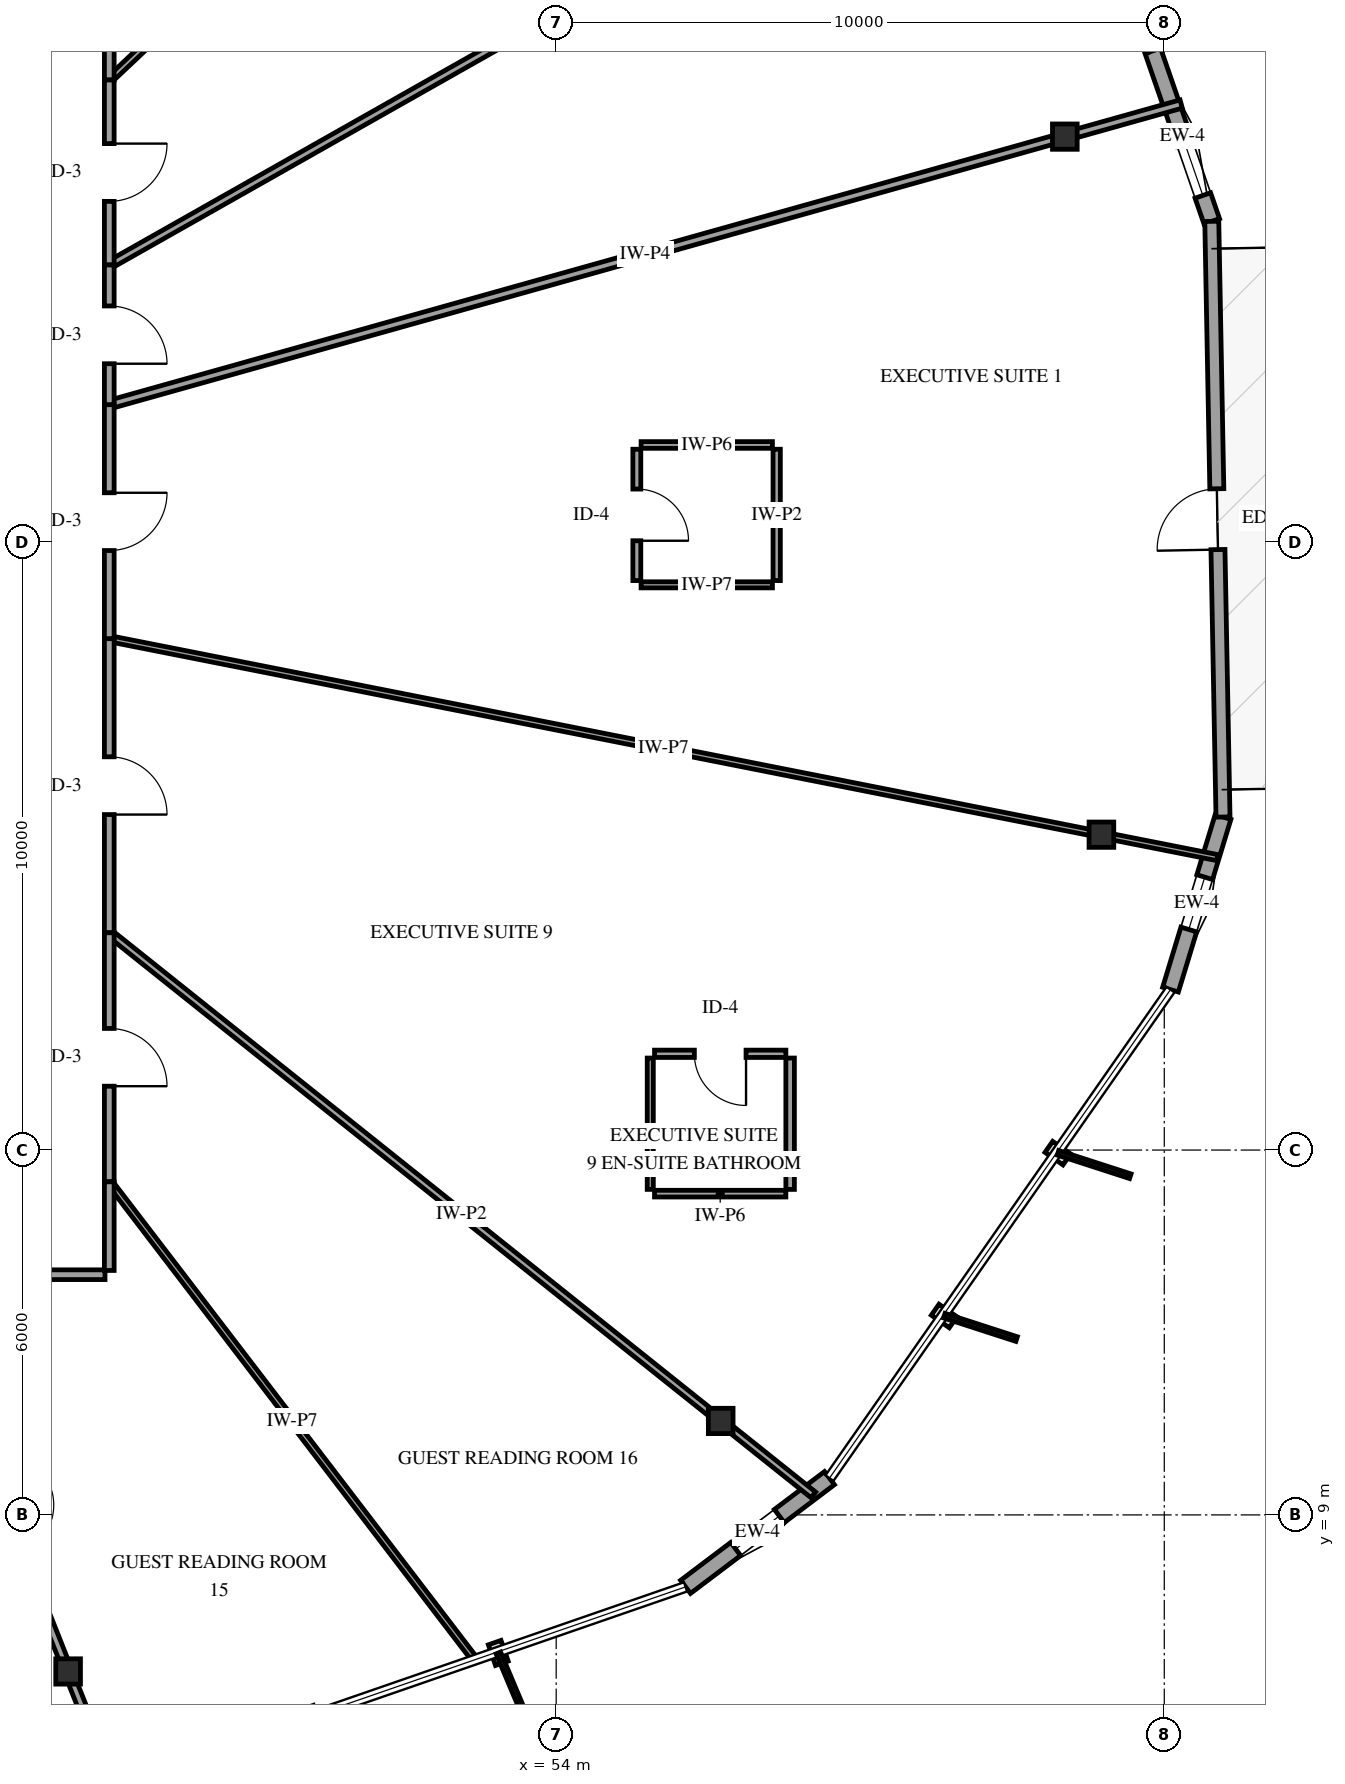
"""IFC4 building model, lengths in metres.
Left out: names, types, materials, properties, quantities, classifications, styles, units other than length and angle.
Written with IfcOpenShell. Run it as: python <this file> out.ifc"""

import sys

from ifc_helpers import new_model, si_unit, direction, frame, frame_2d, origin, origin_2d, place, context, subcontext, project, spatial, rectangle, i_section, extrude, element, fill, save


model = new_model("IFC4")
c1 = context("Model", 3, precision=1e-05, world=origin(), true_north=direction((0.0, 1.0)))
c2 = subcontext(c1, "Body", "Model", "MODEL_VIEW")
j1 = project(units=[si_unit("LENGTHUNIT", "METRE"), si_unit("PLANEANGLEUNIT", "RADIAN")], contexts=[c1])
p1 = place(None, origin())
s1 = spatial("IfcSite", under=j1, at=p1, CompositionType="ELEMENT")
p2 = place(p1, origin())
s2 = spatial("IfcBuilding", under=s1, at=p2, CompositionType="ELEMENT")
p3 = place(p2, frame((0.0, 0.0, 233.8)))
s3 = spatial("IfcBuildingStorey", under=s2, at=p3, CompositionType="ELEMENT", Elevation=233.8)
for number, where, z_axis, x_axis in (
    (1, (62.365, 31.666, 0.0), (0.0, 0.0, 1.0), (1.0, 0.0, 0.0)),
    (2, (45.973, 6.426, 0.0), (0.0, 0.0, 1.0), (1.0, 0.0, 0.0)),
    (3, (56.705, 10.545, 0.0), (0.0, 0.0, 1.0), (1.0, 0.0, 0.0)),
    (4, (62.966, 20.186, 0.0), (0.0, 0.0, 1.0), (1.0, 0.0, 0.0)),
):
    element("IfcColumn", number, at=place(p3, frame(where, z_axis=z_axis, x_axis=x_axis)), inside=s3, PredefinedType="COLUMN", context=c2, shape_type="SweptSolid", body=[
        extrude(i_section(OverallWidth=0.406, OverallDepth=0.416, WebThickness=0.03, FlangeThickness=0.048, FilletRadius=0.038, at=origin_2d()), origin(), (0.0, 0.0, 1.0), 3.6),
    ])
p4 = place(p3, frame((56.127, 7.816, 0.0), z_axis=(0.0, 0.0, 1.0), x_axis=(0.797802225535, 0.602919239145, 0.0)))
e5 = element("IfcWall", 5, at=p4, inside=s3, PredefinedType="SOLIDWALL", context=c2, shape_type="SweptSolid", body=[
    extrude(rectangle(XDim=2.967, YDim=0.27, at=frame_2d((1.483, 0.0))), origin(), (0.0, 0.0, 1.0), 2.599),
])
p5 = place(p4, frame((1.033, 0.0, 0.75)))
e6 = element("IfcOpeningElement", 6, at=p5, cuts=e5, PredefinedType="OPENING", context=c2, shape_type="SweptSolid", body=[
    extrude(rectangle(XDim=0.9, YDim=1.5, at=frame_2d((0.45, 0.75))), frame((0.0, 0.145, 0.0), z_axis=(0.0, -1.0, 0.0), x_axis=(1.0, 0.0, 0.0)), (0.0, 0.0, 1.0), 0.29),
])
p6 = place(p3, frame((64.103, 17.638, 0.0), z_axis=(0.0, 0.0, 1.0), x_axis=(0.290984782506, 0.956727681396, 0.0)))
e7 = element("IfcWall", 7, at=p6, inside=s3, PredefinedType="SOLIDWALL", context=c2, shape_type="SweptSolid", body=[
    extrude(rectangle(XDim=2.967, YDim=0.27, at=frame_2d((1.483, 0.0))), origin(), (0.0, 0.0, 1.0), 2.599),
])
p7 = place(p6, frame((1.033, 0.0, 0.75)))
e8 = element("IfcOpeningElement", 8, at=p7, cuts=e7, PredefinedType="OPENING", context=c2, shape_type="SweptSolid", body=[
    extrude(rectangle(XDim=0.9, YDim=1.5, at=frame_2d((0.45, 0.75))), frame((0.0, 0.145, 0.0), z_axis=(0.0, -1.0, 0.0), x_axis=(1.0, 0.0, 0.0)), (0.0, 0.0, 1.0), 0.29),
])
p8 = place(p3, frame((64.781, 30.273, 0.0), z_axis=(0.0, 0.0, 1.0), x_axis=(-0.326898552416, 0.945059435395, 0.0)))
e9 = element("IfcWall", 9, at=p8, inside=s3, PredefinedType="SOLIDWALL", context=c2, shape_type="SweptSolid", body=[
    extrude(rectangle(XDim=2.967, YDim=0.27, at=frame_2d((1.483, 0.0))), origin(), (0.0, 0.0, 1.0), 2.599),
])
p9 = place(p8, frame((0.45, 0.0, 0.75)))
e10 = element("IfcOpeningElement", 10, at=p9, cuts=e9, PredefinedType="OPENING", context=c2, shape_type="SweptSolid", body=[
    extrude(rectangle(XDim=0.9, YDim=1.5, at=frame_2d((0.45, 0.75))), frame((0.0, 0.145, 0.0), z_axis=(0.0, -1.0, 0.0), x_axis=(1.0, 0.0, 0.0)), (0.0, 0.0, 1.0), 0.29),
])
p10 = place(p3, frame((64.966, 20.477, 0.0), z_axis=(0.0, 0.0, 1.0), x_axis=(-0.018838247523, 0.99982254447, 0.0)))
e11 = element("IfcWall", 11, at=p10, inside=s3, PredefinedType="SOLIDWALL", context=c2, shape_type="SweptSolid", body=[
    extrude(rectangle(XDim=9.798, YDim=0.23, at=frame_2d((4.899, 0.0))), origin(), (0.0, 0.0, 1.0), 2.599),
])
p11 = place(p10, frame((4.399, 0.0, 0.0)))
e12 = element("IfcOpeningElement", 12, at=p11, cuts=e11, PredefinedType="OPENING", context=c2, shape_type="SweptSolid", body=[
    extrude(rectangle(XDim=1.0, YDim=2.15, at=frame_2d((0.5, 1.075))), frame((0.0, 0.125, 0.0), z_axis=(0.0, -1.0, 0.0), x_axis=(1.0, 0.0, 0.0)), (0.0, 0.0, 1.0), 0.25),
])
p12 = place(p3, frame((64.873, 19.809, 0.0), z_axis=(0.0, 0.0, 1.0), x_axis=(-0.981031493606, 0.19384841643, 0.0)))
e13 = element("IfcWall", 13, at=p12, inside=s3, PredefinedType="PARTITIONING", context=c2, shape_type="SweptSolid", body=[
    extrude(rectangle(XDim=18.575, YDim=0.1, at=frame_2d((9.288, 0.0))), origin(), (0.0, 0.0, 1.0), 2.515),
])
p13 = place(p3, frame((46.65, 27.258, 0.0), z_axis=(0.0, 0.0, 1.0), x_axis=(0.962851062981, 0.270033017455, 0.0)))
e14 = element("IfcWall", 14, at=p13, inside=s3, PredefinedType="PARTITIONING", context=c2, shape_type="SweptSolid", body=[
    extrude(rectangle(XDim=18.308, YDim=0.14, at=frame_2d((9.154, 0.0))), origin(), (0.0, 0.0, 1.0), 2.431),
])
p14 = place(p3, frame((46.65, 29.555, 0.0), z_axis=(0.0, 0.0, 1.0), x_axis=(0.870317622411, 0.492490848769, 0.0)))
e15 = element("IfcWall", 15, at=p14, inside=s3, PredefinedType="PARTITIONING", context=c2, shape_type="SweptSolid", body=[
    extrude(rectangle(XDim=15.954, YDim=0.13, at=frame_2d((7.977, 0.0))), origin(), (0.0, 0.0, 1.0), 3.26),
])
p15 = place(p3, frame((46.65, 18.573, 0.0), z_axis=(0.0, 0.0, 1.0), x_axis=(0.781506613228, -0.623896957423, 0.0)))
e16 = element("IfcWall", 16, at=p15, inside=s3, PredefinedType="PARTITIONING", context=c2, shape_type="SweptSolid", body=[
    extrude(rectangle(XDim=14.816, YDim=0.12, at=frame_2d((7.408, 0.0))), origin(), (0.0, 0.0, 1.0), 3.26),
])
p16 = place(p3, frame((46.65, 32.597, 0.0), z_axis=(0.0, 0.0, 1.0), x_axis=(0.727338908676, 0.686278450722, 0.0)))
e17 = element("IfcWall", 17, at=p16, inside=s3, PredefinedType="PARTITIONING", context=c2, shape_type="SweptSolid", body=[
    extrude(rectangle(XDim=13.735, YDim=0.11, at=frame_2d((6.868, 0.0))), origin(), (0.0, 0.0, 1.0), 2.515),
])
p17 = place(p3, frame((46.65, 14.478, 0.0), z_axis=(0.0, 0.0, 1.0), x_axis=(0.60761033938, -0.794235277156, 0.0)))
e18 = element("IfcWall", 18, at=p17, inside=s3, PredefinedType="PARTITIONING", context=c2, shape_type="SweptSolid", body=[
    extrude(rectangle(XDim=9.896, YDim=0.1, at=frame_2d((4.948, 0.0))), origin(), (0.0, 0.0, 1.0), 3.26),
])
p18 = place(p3, frame((43.383, 12.95, 0.0), z_axis=(0.0, 0.0, 1.0), x_axis=(0.369056032082, -0.929407147156, 0.0)))
e19 = element("IfcWall", 19, at=p18, inside=s3, PredefinedType="PARTITIONING", context=c2, shape_type="SweptSolid", body=[
    extrude(rectangle(XDim=9.001, YDim=0.14, at=frame_2d((4.501, 0.0))), origin(), (0.0, 0.0, 1.0), 2.515),
])
p19 = place(p18, frame((4.076, 0.0, 0.0)))
e20 = element("IfcOpeningElement", 20, at=p19, cuts=e19, PredefinedType="OPENING", context=c2, shape_type="SweptSolid", body=[
    extrude(rectangle(XDim=0.85, YDim=2.1, at=frame_2d((0.425, 1.05))), frame((0.0, 0.08, 0.0), z_axis=(0.0, -1.0, 0.0), x_axis=(1.0, 0.0, 0.0)), (0.0, 0.0, 1.0), 0.16),
])
p20 = place(p3, frame((46.65, 23.41, 0.0), z_axis=(0.0, 0.0, 1.0), x_axis=(0.0, -1.0, 0.0)))
e21 = element("IfcWall", 21, at=p20, inside=s3, PredefinedType="PARTITIONING", context=c2, shape_type="SweptSolid", body=[
    extrude(rectangle(XDim=4.837, YDim=0.16, at=frame_2d((2.418, 0.0))), origin(), (0.0, 0.0, 1.0), 3.26),
])
p21 = place(p20, frame((1.943, 0.0, 0.0)))
e22 = element("IfcOpeningElement", 22, at=p21, cuts=e21, PredefinedType="OPENING", context=c2, shape_type="SweptSolid", body=[
    extrude(rectangle(XDim=0.95, YDim=2.15, at=frame_2d((0.475, 1.075))), frame((0.0, 0.09, 0.0), z_axis=(0.0, -1.0, 0.0), x_axis=(1.0, 0.0, 0.0)), (0.0, 0.0, 1.0), 0.18),
])
p22 = place(p3, frame((46.65, 36.98, 0.0), z_axis=(0.0, 0.0, 1.0), x_axis=(0.0, -1.0, 0.0)))
e23 = element("IfcWall", 23, at=p22, inside=s3, PredefinedType="PARTITIONING", context=c2, shape_type="SweptSolid", body=[
    extrude(rectangle(XDim=4.383, YDim=0.16, at=frame_2d((2.191, 0.0))), origin(), (0.0, 0.0, 1.0), 3.26),
])
p23 = place(p3, frame((46.65, 18.573, 0.0), z_axis=(0.0, 0.0, 1.0), x_axis=(0.0, -1.0, 0.0)))
e24 = element("IfcWall", 24, at=p23, inside=s3, PredefinedType="PARTITIONING", context=c2, shape_type="SweptSolid", body=[
    extrude(rectangle(XDim=4.095, YDim=0.16, at=frame_2d((2.047, 0.0))), origin(), (0.0, 0.0, 1.0), 3.26),
])
p24 = place(p23, frame((1.573, 0.0, 0.0)))
e25 = element("IfcOpeningElement", 25, at=p24, cuts=e24, PredefinedType="OPENING", context=c2, shape_type="SweptSolid", body=[
    extrude(rectangle(XDim=0.95, YDim=2.15, at=frame_2d((0.475, 1.075))), frame((0.0, 0.09, 0.0), z_axis=(0.0, -1.0, 0.0), x_axis=(1.0, 0.0, 0.0)), (0.0, 0.0, 1.0), 0.18),
])
p25 = place(p3, frame((46.65, 27.258, 0.0), z_axis=(0.0, 0.0, 1.0), x_axis=(0.0, -1.0, 0.0)))
e26 = element("IfcWall", 26, at=p25, inside=s3, PredefinedType="PARTITIONING", context=c2, shape_type="SweptSolid", body=[
    extrude(rectangle(XDim=3.848, YDim=0.16, at=frame_2d((1.924, 0.0))), origin(), (0.0, 0.0, 1.0), 3.26),
])
p26 = place(p25, frame((1.449, 0.0, 0.0)))
e27 = element("IfcOpeningElement", 27, at=p26, cuts=e26, PredefinedType="OPENING", context=c2, shape_type="SweptSolid", body=[
    extrude(rectangle(XDim=0.95, YDim=2.15, at=frame_2d((0.475, 1.075))), frame((0.0, 0.09, 0.0), z_axis=(0.0, -1.0, 0.0), x_axis=(1.0, 0.0, 0.0)), (0.0, 0.0, 1.0), 0.18),
])
p27 = place(p3, frame((46.58, 12.95, 0.0), z_axis=(0.0, 0.0, 1.0), x_axis=(-1.0, 0.0, 0.0)))
e28 = element("IfcWall", 28, at=p27, inside=s3, PredefinedType="PARTITIONING", context=c2, shape_type="SweptSolid", body=[
    extrude(rectangle(XDim=3.197, YDim=0.16, at=frame_2d((1.599, 0.0))), origin(), (0.0, 0.0, 1.0), 3.26),
])
p28 = place(p27, frame((1.123, 0.0, 0.0)))
e29 = element("IfcOpeningElement", 29, at=p28, cuts=e28, PredefinedType="OPENING", context=c2, shape_type="SweptSolid", body=[
    extrude(rectangle(XDim=0.95, YDim=2.15, at=frame_2d((0.475, 1.075))), frame((0.0, 0.09, 0.0), z_axis=(0.0, -1.0, 0.0), x_axis=(1.0, 0.0, 0.0)), (0.0, 0.0, 1.0), 0.18),
])
p29 = place(p3, frame((46.65, 32.597, 0.0), z_axis=(0.0, 0.0, 1.0), x_axis=(0.0, -1.0, 0.0)))
e30 = element("IfcWall", 30, at=p29, inside=s3, PredefinedType="PARTITIONING", context=c2, shape_type="SweptSolid", body=[
    extrude(rectangle(XDim=3.042, YDim=0.16, at=frame_2d((1.521, 0.0))), origin(), (0.0, 0.0, 1.0), 3.26),
])
p30 = place(p29, frame((1.046, 0.0, 0.0)))
e31 = element("IfcOpeningElement", 31, at=p30, cuts=e30, PredefinedType="OPENING", context=c2, shape_type="SweptSolid", body=[
    extrude(rectangle(XDim=0.95, YDim=2.15, at=frame_2d((0.475, 1.075))), frame((0.0, 0.09, 0.0), z_axis=(0.0, -1.0, 0.0), x_axis=(1.0, 0.0, 0.0)), (0.0, 0.0, 1.0), 0.18),
])
p31 = place(p3, frame((46.65, 29.555, 0.0), z_axis=(0.0, 0.0, 1.0), x_axis=(0.0, -1.0, 0.0)))
e32 = element("IfcWall", 32, at=p31, inside=s3, PredefinedType="PARTITIONING", context=c2, shape_type="SweptSolid", body=[
    extrude(rectangle(XDim=2.297, YDim=0.16, at=frame_2d((1.148, 0.0))), origin(), (0.0, 0.0, 1.0), 3.26),
])
p32 = place(p31, frame((0.674, 0.0, 0.0)))
e33 = element("IfcOpeningElement", 33, at=p32, cuts=e32, PredefinedType="OPENING", context=c2, shape_type="SweptSolid", body=[
    extrude(rectangle(XDim=0.95, YDim=2.15, at=frame_2d((0.475, 1.075))), frame((0.0, 0.09, 0.0), z_axis=(0.0, -1.0, 0.0), x_axis=(1.0, 0.0, 0.0)), (0.0, 0.0, 1.0), 0.18),
])
p33 = place(p3, frame((57.777, 16.583, 0.0), z_axis=(0.0, 0.0, 1.0), x_axis=(-1.0, 0.0, 0.0)))
e34 = element("IfcWall", 34, at=p33, inside=s3, PredefinedType="PARTITIONING", context=c2, shape_type="SweptSolid", body=[
    extrude(rectangle(XDim=2.16, YDim=0.12, at=frame_2d((1.08, 0.0))), origin(), (0.0, 0.0, 1.0), 3.26),
])
p34 = place(p33, frame((0.655, 0.0, 0.0)))
e35 = element("IfcOpeningElement", 35, at=p34, cuts=e34, PredefinedType="OPENING", context=c2, shape_type="SweptSolid", body=[
    extrude(rectangle(XDim=0.85, YDim=2.1, at=frame_2d((0.425, 1.05))), frame((0.0, 0.07, 0.0), z_axis=(0.0, -1.0, 0.0), x_axis=(1.0, 0.0, 0.0)), (0.0, 0.0, 1.0), 0.14),
])
p35 = place(p3, frame((55.617, 14.283, 0.0), z_axis=(0.0, 0.0, 1.0), x_axis=(1.0, 0.0, 0.0)))
e36 = element("IfcWall", 36, at=p35, inside=s3, PredefinedType="PARTITIONING", context=c2, shape_type="SweptSolid", body=[
    extrude(rectangle(XDim=2.16, YDim=0.11, at=frame_2d((1.08, 0.0))), origin(), (0.0, 0.0, 1.0), 3.26),
])
p36 = place(p3, frame((55.547, 16.513, 0.0), z_axis=(0.0, 0.0, 1.0), x_axis=(0.0, -1.0, 0.0)))
e37 = element("IfcWall", 37, at=p36, inside=s3, PredefinedType="PARTITIONING", context=c2, shape_type="SweptSolid", body=[
    extrude(rectangle(XDim=2.16, YDim=0.1, at=frame_2d((1.08, 0.0))), origin(), (0.0, 0.0, 1.0), 3.26),
])
p37 = place(p3, frame((57.847, 14.353, 0.0), z_axis=(0.0, 0.0, 1.0), x_axis=(0.0, 1.0, 0.0)))
e38 = element("IfcWall", 38, at=p37, inside=s3, PredefinedType="PARTITIONING", context=c2, shape_type="SweptSolid", body=[
    extrude(rectangle(XDim=2.16, YDim=0.14, at=frame_2d((1.08, 0.0))), origin(), (0.0, 0.0, 1.0), 3.26),
])
p38 = place(p3, frame((55.326, 26.525, 0.0), z_axis=(0.0, 0.0, 1.0), x_axis=(0.0, -1.0, 0.0)))
e39 = element("IfcWall", 39, at=p38, inside=s3, PredefinedType="PARTITIONING", context=c2, shape_type="SweptSolid", body=[
    extrude(rectangle(XDim=2.16, YDim=0.13, at=frame_2d((1.08, 0.0))), origin(), (0.0, 0.0, 1.0), 3.26),
])
p39 = place(p38, frame((0.655, 0.0, 0.0)))
e40 = element("IfcOpeningElement", 40, at=p39, cuts=e39, PredefinedType="OPENING", context=c2, shape_type="SweptSolid", body=[
    extrude(rectangle(XDim=0.85, YDim=2.1, at=frame_2d((0.425, 1.05))), frame((0.0, 0.075, 0.0), z_axis=(0.0, -1.0, 0.0), x_axis=(1.0, 0.0, 0.0)), (0.0, 0.0, 1.0), 0.15),
])
p40 = place(p3, frame((57.626, 24.365, 0.0), z_axis=(0.0, 0.0, 1.0), x_axis=(0.0, 1.0, 0.0)))
e41 = element("IfcWall", 41, at=p40, inside=s3, PredefinedType="PARTITIONING", context=c2, shape_type="SweptSolid", body=[
    extrude(rectangle(XDim=2.16, YDim=0.12, at=frame_2d((1.08, 0.0))), origin(), (0.0, 0.0, 1.0), 3.26),
])
p41 = place(p3, frame((57.556, 26.595, 0.0), z_axis=(0.0, 0.0, 1.0), x_axis=(-1.0, 0.0, 0.0)))
e42 = element("IfcWall", 42, at=p41, inside=s3, PredefinedType="PARTITIONING", context=c2, shape_type="SweptSolid", body=[
    extrude(rectangle(XDim=2.16, YDim=0.11, at=frame_2d((1.08, 0.0))), origin(), (0.0, 0.0, 1.0), 3.26),
])
p42 = place(p3, frame((55.396, 24.295, 0.0), z_axis=(0.0, 0.0, 1.0), x_axis=(1.0, 0.0, 0.0)))
e43 = element("IfcWall", 43, at=p42, inside=s3, PredefinedType="PARTITIONING", context=c2, shape_type="SweptSolid", body=[
    extrude(rectangle(XDim=2.16, YDim=0.1, at=frame_2d((1.08, 0.0))), origin(), (0.0, 0.0, 1.0), 3.26),
])
p43 = place(p3, frame((46.65, 14.478, 0.0), z_axis=(0.0, 0.0, 1.0), x_axis=(0.0, -1.0, 0.0)))
e44 = element("IfcWall", 44, at=p43, inside=s3, PredefinedType="PARTITIONING", context=c2, shape_type="SweptSolid", body=[
    extrude(rectangle(XDim=1.458, YDim=0.16, at=frame_2d((0.729, 0.0))), origin(), (0.0, 0.0, 1.0), 3.26),
])
p44 = place(p5, origin())
e45 = element("IfcWindow", 45, at=p44, inside=s3, PartitioningType="SINGLE_PANEL", PredefinedType="WINDOW", context=c2, shape_type="SweptSolid", body=[
    extrude(rectangle(XDim=0.9, YDim=1.5, at=frame_2d((0.45, 0.75))), frame((0.0, 0.03, 0.0), z_axis=(0.0, -1.0, 0.0), x_axis=(1.0, 0.0, 0.0)), (0.0, 0.0, 1.0), 0.06),
])
fill(e6, e45)
p45 = place(p7, origin())
e46 = element("IfcWindow", 46, at=p45, inside=s3, PartitioningType="SINGLE_PANEL", PredefinedType="WINDOW", context=c2, shape_type="SweptSolid", body=[
    extrude(rectangle(XDim=0.9, YDim=1.5, at=frame_2d((0.45, 0.75))), frame((0.0, 0.03, 0.0), z_axis=(0.0, -1.0, 0.0), x_axis=(1.0, 0.0, 0.0)), (0.0, 0.0, 1.0), 0.06),
])
fill(e8, e46)
p46 = place(p9, origin())
e47 = element("IfcWindow", 47, at=p46, inside=s3, PartitioningType="SINGLE_PANEL", PredefinedType="WINDOW", context=c2, shape_type="SweptSolid", body=[
    extrude(rectangle(XDim=0.9, YDim=1.5, at=frame_2d((0.45, 0.75))), frame((0.0, 0.03, 0.0), z_axis=(0.0, -1.0, 0.0), x_axis=(1.0, 0.0, 0.0)), (0.0, 0.0, 1.0), 0.06),
])
fill(e10, e47)
p47 = place(p11, origin())
e48 = element("IfcDoor", 48, at=p47, inside=s3, OperationType="SINGLE_SWING_LEFT", PredefinedType="DOOR", context=c2, shape_type="SweptSolid", body=[
    extrude(rectangle(XDim=1.0, YDim=2.15, at=frame_2d((0.5, 1.075))), frame((0.0, 0.025, 0.0), z_axis=(0.0, -1.0, 0.0), x_axis=(1.0, 0.0, 0.0)), (0.0, 0.0, 1.0), 0.05),
])
fill(e12, e48)
p48 = place(p21, origin())
e49 = element("IfcDoor", 49, at=p48, inside=s3, OperationType="SINGLE_SWING_RIGHT", PredefinedType="DOOR", context=c2, shape_type="SweptSolid", body=[
    extrude(rectangle(XDim=0.95, YDim=2.15, at=frame_2d((0.475, 1.075))), frame((0.0, 0.025, 0.0), z_axis=(0.0, -1.0, 0.0), x_axis=(1.0, 0.0, 0.0)), (0.0, 0.0, 1.0), 0.05),
])
fill(e22, e49)
p49 = place(p24, origin())
e50 = element("IfcDoor", 50, at=p49, inside=s3, OperationType="SINGLE_SWING_RIGHT", PredefinedType="DOOR", context=c2, shape_type="SweptSolid", body=[
    extrude(rectangle(XDim=0.95, YDim=2.15, at=frame_2d((0.475, 1.075))), frame((0.0, 0.025, 0.0), z_axis=(0.0, -1.0, 0.0), x_axis=(1.0, 0.0, 0.0)), (0.0, 0.0, 1.0), 0.05),
])
fill(e25, e50)
p50 = place(p26, origin())
e51 = element("IfcDoor", 51, at=p50, inside=s3, OperationType="SINGLE_SWING_LEFT", PredefinedType="DOOR", context=c2, shape_type="SweptSolid", body=[
    extrude(rectangle(XDim=0.95, YDim=2.15, at=frame_2d((0.475, 1.075))), frame((0.0, 0.025, 0.0), z_axis=(0.0, -1.0, 0.0), x_axis=(1.0, 0.0, 0.0)), (0.0, 0.0, 1.0), 0.05),
])
fill(e27, e51)
p51 = place(p30, origin())
e52 = element("IfcDoor", 52, at=p51, inside=s3, OperationType="SINGLE_SWING_LEFT", PredefinedType="DOOR", context=c2, shape_type="SweptSolid", body=[
    extrude(rectangle(XDim=0.95, YDim=2.15, at=frame_2d((0.475, 1.075))), frame((0.0, 0.025, 0.0), z_axis=(0.0, -1.0, 0.0), x_axis=(1.0, 0.0, 0.0)), (0.0, 0.0, 1.0), 0.05),
])
fill(e31, e52)
p52 = place(p32, origin())
e53 = element("IfcDoor", 53, at=p52, inside=s3, OperationType="SINGLE_SWING_RIGHT", PredefinedType="DOOR", context=c2, shape_type="SweptSolid", body=[
    extrude(rectangle(XDim=0.95, YDim=2.15, at=frame_2d((0.475, 1.075))), frame((0.0, 0.025, 0.0), z_axis=(0.0, -1.0, 0.0), x_axis=(1.0, 0.0, 0.0)), (0.0, 0.0, 1.0), 0.05),
])
fill(e33, e53)
p53 = place(p34, origin())
e54 = element("IfcDoor", 54, at=p53, inside=s3, OperationType="SINGLE_SWING_LEFT", PredefinedType="DOOR", context=c2, shape_type="SweptSolid", body=[
    extrude(rectangle(XDim=0.85, YDim=2.1, at=frame_2d((0.425, 1.05))), frame((0.0, 0.025, 0.0), z_axis=(0.0, -1.0, 0.0), x_axis=(1.0, 0.0, 0.0)), (0.0, 0.0, 1.0), 0.05),
])
fill(e35, e54)
p54 = place(p39, origin())
e55 = element("IfcDoor", 55, at=p54, inside=s3, OperationType="SINGLE_SWING_RIGHT", PredefinedType="DOOR", context=c2, shape_type="SweptSolid", body=[
    extrude(rectangle(XDim=0.85, YDim=2.1, at=frame_2d((0.425, 1.05))), frame((0.0, 0.025, 0.0), z_axis=(0.0, -1.0, 0.0), x_axis=(1.0, 0.0, 0.0)), (0.0, 0.0, 1.0), 0.05),
])
fill(e40, e55)
save(model, sys.argv[1])
